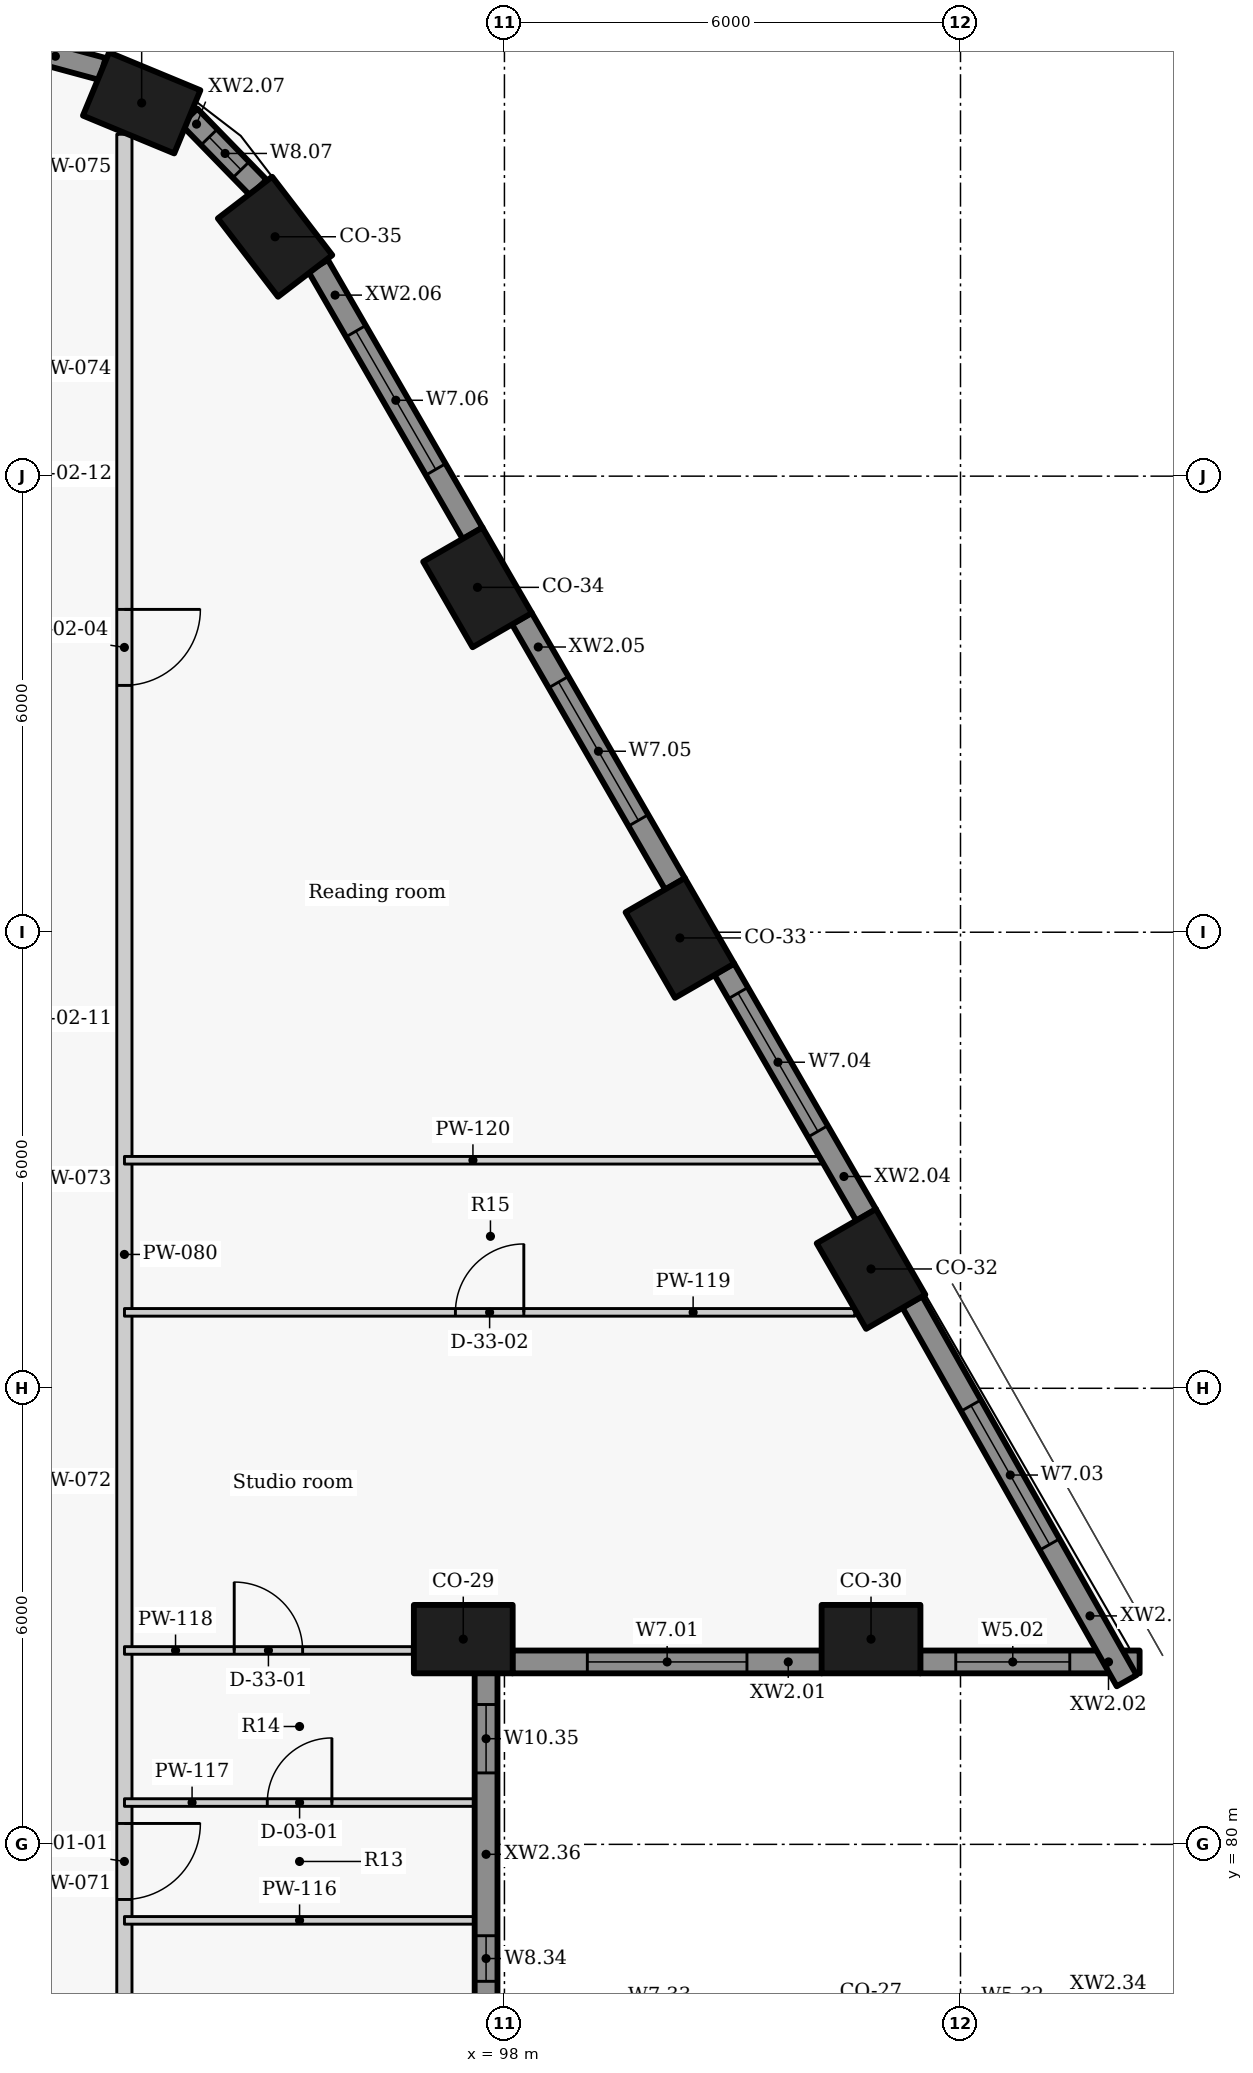
"""IFC4 building model, lengths in metres.
Left out: names, types, materials, properties, quantities, classifications, styles, units other than length and angle.
Written with IfcOpenShell. Run it as: python <this file> out.ifc"""

import sys

from ifc_helpers import new_model, si_unit, direction, frame, frame_2d, origin, origin_2d, place, context, subcontext, project, spatial, rectangle, extrude, element, fill, save


model = new_model("IFC4")
c1 = context("Model", 3, precision=1e-05, world=origin(), true_north=direction((0.0, 1.0)))
c2 = subcontext(c1, "Body", "Model", "MODEL_VIEW")
j1 = project(units=[si_unit("LENGTHUNIT", "METRE"), si_unit("PLANEANGLEUNIT", "RADIAN")], contexts=[c1])
p1 = place(None, origin())
s1 = spatial("IfcSite", under=j1, at=p1, CompositionType="ELEMENT")
p2 = place(p1, origin())
s2 = spatial("IfcBuilding", under=s1, at=p2, CompositionType="ELEMENT")
p3 = place(p2, frame((0.0, 0.0, 150.3)))
s3 = spatial("IfcBuildingStorey", under=s2, at=p3, CompositionType="ELEMENT", Elevation=150.3)
for number, where, z_axis, x_axis in (
    (1, (97.458, 82.7, 0.0), (0.0, 0.0, 1.0), (1.0, 0.0, 0.0)),
    (2, (102.823, 82.7, 0.0), (0.0, 0.0, 1.0), (1.0, 0.0, 0.0)),
    (3, (102.823, 87.57, 0.0), (0.0, 0.0, 1.0), (-0.5, 0.866, 0.0)),
    (4, (100.308, 91.925, 0.0), (0.0, 0.0, 1.0), (-0.5, 0.866, 0.0)),
    (5, (97.646, 96.537, 0.0), (0.0, 0.0, 1.0), (-0.5, 0.866, 0.0)),
    (6, (94.982, 101.149, 0.0), (0.0, 0.0, 1.0), (-0.609, 0.793, 0.0)),
    (7, (93.227, 102.91, 0.0), (0.0, 0.0, 1.0), (-0.924, 0.383, 0.0)),
):
    element("IfcColumn", number, at=place(p3, frame(where, z_axis=z_axis, x_axis=x_axis)), inside=s3, PredefinedType="COLUMN", context=c2, shape_type="SweptSolid", body=[
        extrude(rectangle(XDim=1.3, YDim=0.9, at=origin_2d()), origin(), (0.0, 0.0, 1.0), 3.3),
    ])
p4 = place(p3, frame((98.104, 82.4, 0.0), z_axis=(0.0, 0.0, 1.0), x_axis=(1.0, 0.0, 0.0)))
e8 = element("IfcWall", 8, at=p4, inside=s3, PredefinedType="SOLIDWALL", context=c2, shape_type="SweptSolid", body=[
    extrude(rectangle(XDim=4.073, YDim=0.3, at=frame_2d((2.036, 0.0))), origin(), (0.0, 0.0, 1.0), 2.425),
])
p5 = place(p4, frame((0.986, 0.0, 0.9)))
e9 = element("IfcOpeningElement", 9, at=p5, cuts=e8, PredefinedType="OPENING", context=c2, shape_type="SweptSolid", body=[
    extrude(rectangle(XDim=2.1, YDim=1.1, at=frame_2d((1.05, 0.55))), frame((0.0, 0.16, 0.0), z_axis=(0.0, -1.0, 0.0), x_axis=(1.0, 0.0, 0.0)), (0.0, 0.0, 1.0), 0.32),
])
p6 = place(p3, frame((103.469, 82.4, 0.0), z_axis=(0.0, 0.0, 1.0), x_axis=(1.0, 0.0, 0.0)))
e10 = element("IfcWall", 10, at=p6, inside=s3, PredefinedType="SOLIDWALL", context=c2, shape_type="SweptSolid", body=[
    extrude(rectangle(XDim=2.888, YDim=0.3, at=frame_2d((1.444, 0.0))), origin(), (0.0, 0.0, 1.0), 2.425),
])
p7 = place(p6, frame((0.469, 0.0, 0.9)))
e11 = element("IfcOpeningElement", 11, at=p7, cuts=e10, PredefinedType="OPENING", context=c2, shape_type="SweptSolid", body=[
    extrude(rectangle(XDim=1.5, YDim=1.1, at=frame_2d((0.75, 0.55))), frame((0.0, 0.16, 0.0), z_axis=(0.0, -1.0, 0.0), x_axis=(1.0, 0.0, 0.0)), (0.0, 0.0, 1.0), 0.32),
])
p8 = place(p3, frame((106.186, 82.153, 0.0), z_axis=(0.0, 0.0, 1.0), x_axis=(-0.492498306264, 0.87031340236, 0.0)))
e12 = element("IfcWall", 12, at=p8, inside=s3, PredefinedType="SOLIDWALL", context=c2, shape_type="SweptSolid", body=[
    extrude(rectangle(XDim=5.727, YDim=0.3, at=frame_2d((2.863, 0.0))), origin(), (0.0, 0.0, 1.0), 2.425),
])
p9 = place(p8, frame((2.059, 0.0, 0.9)))
e13 = element("IfcOpeningElement", 13, at=p9, cuts=e12, PredefinedType="OPENING", context=c2, shape_type="SweptSolid", body=[
    extrude(rectangle(XDim=2.1, YDim=1.1, at=frame_2d((1.05, 0.55))), frame((0.0, 0.16, 0.0), z_axis=(0.0, -1.0, 0.0), x_axis=(1.0, 0.0, 0.0)), (0.0, 0.0, 1.0), 0.32),
])
p10 = place(p3, frame((102.76, 88.279, 0.0), z_axis=(0.0, 0.0, 1.0), x_axis=(-0.499933594891, 0.866063739398, 0.0)))
e14 = element("IfcWall", 14, at=p10, inside=s3, PredefinedType="SOLIDWALL", context=c2, shape_type="SweptSolid", body=[
    extrude(rectangle(XDim=3.737, YDim=0.3, at=frame_2d((1.868, 0.0))), origin(), (0.0, 0.0, 1.0), 2.425),
])
p11 = place(p10, frame((1.272, 0.0, 0.9)))
e15 = element("IfcOpeningElement", 15, at=p11, cuts=e14, PredefinedType="OPENING", context=c2, shape_type="SweptSolid", body=[
    extrude(rectangle(XDim=2.1, YDim=1.1, at=frame_2d((1.05, 0.55))), frame((0.0, 0.16, 0.0), z_axis=(0.0, -1.0, 0.0), x_axis=(1.0, 0.0, 0.0)), (0.0, 0.0, 1.0), 0.32),
])
p12 = place(p3, frame((100.245, 92.634, 0.0), z_axis=(0.0, 0.0, 1.0), x_axis=(-0.500031546601, 0.86600718958, 0.0)))
e16 = element("IfcWall", 16, at=p12, inside=s3, PredefinedType="SOLIDWALL", context=c2, shape_type="SweptSolid", body=[
    extrude(rectangle(XDim=4.034, YDim=0.3, at=frame_2d((2.017, 0.0))), origin(), (0.0, 0.0, 1.0), 2.425),
])
p13 = place(p12, frame((0.967, 0.0, 0.9)))
e17 = element("IfcOpeningElement", 17, at=p13, cuts=e16, PredefinedType="OPENING", context=c2, shape_type="SweptSolid", body=[
    extrude(rectangle(XDim=2.1, YDim=1.1, at=frame_2d((1.05, 0.55))), frame((0.0, 0.16, 0.0), z_axis=(0.0, -1.0, 0.0), x_axis=(1.0, 0.0, 0.0)), (0.0, 0.0, 1.0), 0.32),
])
p14 = place(p3, frame((97.582, 97.247, 0.0), z_axis=(0.0, 0.0, 1.0), x_axis=(-0.500018589245, 0.866014671013, 0.0)))
e18 = element("IfcWall", 18, at=p14, inside=s3, PredefinedType="SOLIDWALL", context=c2, shape_type="SweptSolid", body=[
    extrude(rectangle(XDim=4.068, YDim=0.3, at=frame_2d((2.034, 0.0))), origin(), (0.0, 0.0, 1.0), 2.425),
])
p15 = place(p14, frame((0.973, 0.0, 0.9)))
e19 = element("IfcOpeningElement", 19, at=p15, cuts=e18, PredefinedType="OPENING", context=c2, shape_type="SweptSolid", body=[
    extrude(rectangle(XDim=2.1, YDim=1.1, at=frame_2d((1.05, 0.55))), frame((0.0, 0.16, 0.0), z_axis=(0.0, -1.0, 0.0), x_axis=(1.0, 0.0, 0.0)), (0.0, 0.0, 1.0), 0.32),
])
p16 = place(p3, frame((94.763, 101.795, 0.0), z_axis=(0.0, 0.0, 1.0), x_axis=(-0.697598997785, 0.716488407645, 0.0)))
e20 = element("IfcWall", 20, at=p16, inside=s3, PredefinedType="SOLIDWALL", context=c2, shape_type="SweptSolid", body=[
    extrude(rectangle(XDim=1.305, YDim=0.3, at=frame_2d((0.653, 0.0))), origin(), (0.0, 0.0, 1.0), 2.425),
])
p17 = place(p16, frame((0.328, 0.0, 0.9)))
e21 = element("IfcOpeningElement", 21, at=p17, cuts=e20, PredefinedType="OPENING", context=c2, shape_type="SweptSolid", body=[
    extrude(rectangle(XDim=0.6, YDim=1.1, at=frame_2d((0.3, 0.55))), frame((0.0, 0.16, 0.0), z_axis=(0.0, -1.0, 0.0), x_axis=(1.0, 0.0, 0.0)), (0.0, 0.0, 1.0), 0.32),
])
p18 = place(p3, frame((92.713, 103.356, 0.0), z_axis=(0.0, 0.0, 1.0), x_axis=(-0.965274225809, 0.26123872031, 0.0)))
e22 = element("IfcWall", 22, at=p18, inside=s3, PredefinedType="SOLIDWALL", context=c2, shape_type="SweptSolid", body=[
    extrude(rectangle(XDim=1.287, YDim=0.3, at=frame_2d((0.644, 0.0))), origin(), (0.0, 0.0, 1.0), 2.425),
])
p19 = place(p3, frame((97.758, 77.946, 0.0), z_axis=(0.0, 0.0, 1.0), x_axis=(0.0, 1.0, 0.0)))
e23 = element("IfcWall", 23, at=p19, inside=s3, PredefinedType="SOLIDWALL", context=c2, shape_type="SweptSolid", body=[
    extrude(rectangle(XDim=4.308, YDim=0.3, at=frame_2d((2.154, 0.0))), origin(), (0.0, 0.0, 1.0), 2.425),
])
p20 = place(p19, frame((0.252, 0.0, 0.9)))
e24 = element("IfcOpeningElement", 24, at=p20, cuts=e23, PredefinedType="OPENING", context=c2, shape_type="SweptSolid", body=[
    extrude(rectangle(XDim=0.6, YDim=1.1, at=frame_2d((0.3, 0.55))), frame((0.0, 0.16, 0.0), z_axis=(0.0, -1.0, 0.0), x_axis=(1.0, 0.0, 0.0)), (0.0, 0.0, 1.0), 0.32),
])
p21 = place(p19, frame((2.994, 0.0, 1.5)))
e25 = element("IfcOpeningElement", 25, at=p21, cuts=e23, PredefinedType="OPENING", context=c2, shape_type="SweptSolid", body=[
    extrude(rectangle(XDim=0.9, YDim=0.5, at=frame_2d((0.45, 0.25))), frame((0.0, 0.16, 0.0), z_axis=(0.0, -1.0, 0.0), x_axis=(1.0, 0.0, 0.0)), (0.0, 0.0, 1.0), 0.32),
])
p22 = place(p3, frame((93.0, 102.498, 0.0), z_axis=(0.0, 0.0, 1.0), x_axis=(0.0, -1.0, 0.0)))
e26 = element("IfcWall", 26, at=p22, inside=s3, PredefinedType="PARTITIONING", context=c2, shape_type="SweptSolid", body=[
    extrude(rectangle(XDim=45.665, YDim=0.2, at=frame_2d((22.833, 0.0))), origin(), (0.0, 0.0, 1.0), 2.405),
])
p23 = place(p22, frame((34.081, 0.0, 0.0)))
e27 = element("IfcOpeningElement", 27, at=p23, cuts=e26, PredefinedType="OPENING", context=c2, shape_type="SweptSolid", body=[
    extrude(rectangle(XDim=1.0, YDim=2.1, at=frame_2d((0.5, 1.05))), frame((0.0, 0.11, 0.0), z_axis=(0.0, -1.0, 0.0), x_axis=(1.0, 0.0, 0.0)), (0.0, 0.0, 1.0), 0.22),
])
p24 = place(p22, frame((22.223, 0.0, 0.0)))
e28 = element("IfcOpeningElement", 28, at=p24, cuts=e26, PredefinedType="OPENING", context=c2, shape_type="SweptSolid", body=[
    extrude(rectangle(XDim=1.0, YDim=2.1, at=frame_2d((0.5, 1.05))), frame((0.0, 0.11, 0.0), z_axis=(0.0, -1.0, 0.0), x_axis=(1.0, 0.0, 0.0)), (0.0, 0.0, 1.0), 0.22),
])
p25 = place(p22, frame((6.251, 0.0, 0.0)))
e29 = element("IfcOpeningElement", 29, at=p25, cuts=e26, PredefinedType="OPENING", context=c2, shape_type="SweptSolid", body=[
    extrude(rectangle(XDim=1.0, YDim=2.1, at=frame_2d((0.5, 1.05))), frame((0.0, 0.11, 0.0), z_axis=(0.0, -1.0, 0.0), x_axis=(1.0, 0.0, 0.0)), (0.0, 0.0, 1.0), 0.22),
])
p26 = place(p3, frame((93.001, 79.0, 0.0), z_axis=(0.0, 0.0, 1.0), x_axis=(1.0, 0.0, 0.0)))
e30 = element("IfcWall", 30, at=p26, inside=s3, PredefinedType="PARTITIONING", context=c2, shape_type="SweptSolid", body=[
    extrude(rectangle(XDim=4.607, YDim=0.1, at=frame_2d((2.304, 0.0))), origin(), (0.0, 0.0, 1.0), 2.405),
])
p27 = place(p3, frame((93.001, 80.55, 0.0), z_axis=(0.0, 0.0, 1.0), x_axis=(1.0, 0.0, 0.0)))
e31 = element("IfcWall", 31, at=p27, inside=s3, PredefinedType="PARTITIONING", context=c2, shape_type="SweptSolid", body=[
    extrude(rectangle(XDim=4.607, YDim=0.1, at=frame_2d((2.304, 0.0))), origin(), (0.0, 0.0, 1.0), 2.405),
])
p28 = place(p27, frame((1.879, 0.0, 0.0)))
e32 = element("IfcOpeningElement", 32, at=p28, cuts=e31, PredefinedType="OPENING", context=c2, shape_type="SweptSolid", body=[
    extrude(rectangle(XDim=0.85, YDim=2.1, at=frame_2d((0.425, 1.05))), frame((0.0, 0.06, 0.0), z_axis=(0.0, -1.0, 0.0), x_axis=(1.0, 0.0, 0.0)), (0.0, 0.0, 1.0), 0.12),
])
p29 = place(p3, frame((93.001, 82.551, 0.0), z_axis=(0.0, 0.0, 1.0), x_axis=(1.0, 0.0, 0.0)))
e33 = element("IfcWall", 33, at=p29, inside=s3, PredefinedType="PARTITIONING", context=c2, shape_type="SweptSolid", body=[
    extrude(rectangle(XDim=3.787, YDim=0.1, at=frame_2d((1.894, 0.0))), origin(), (0.0, 0.0, 1.0), 3.025),
])
p30 = place(p29, frame((1.444, 0.0, 0.0)))
e34 = element("IfcOpeningElement", 34, at=p30, cuts=e33, PredefinedType="OPENING", context=c2, shape_type="SweptSolid", body=[
    extrude(rectangle(XDim=0.9, YDim=2.1, at=frame_2d((0.45, 1.05))), frame((0.0, 0.06, 0.0), z_axis=(0.0, -1.0, 0.0), x_axis=(1.0, 0.0, 0.0)), (0.0, 0.0, 1.0), 0.12),
])
p31 = place(p3, frame((93.001, 86.999, 0.0), z_axis=(0.0, 0.0, 1.0), x_axis=(1.0, 0.0, 0.0)))
e35 = element("IfcWall", 35, at=p31, inside=s3, PredefinedType="PARTITIONING", context=c2, shape_type="SweptSolid", body=[
    extrude(rectangle(XDim=9.609, YDim=0.1, at=frame_2d((4.804, 0.0))), origin(), (0.0, 0.0, 1.0), 3.025),
])
p32 = place(p31, frame((4.354, 0.0, 0.0)))
e36 = element("IfcOpeningElement", 36, at=p32, cuts=e35, PredefinedType="OPENING", context=c2, shape_type="SweptSolid", body=[
    extrude(rectangle(XDim=0.9, YDim=2.1, at=frame_2d((0.45, 1.05))), frame((0.0, 0.06, 0.0), z_axis=(0.0, -1.0, 0.0), x_axis=(1.0, 0.0, 0.0)), (0.0, 0.0, 1.0), 0.12),
])
p33 = place(p3, frame((93.001, 89.0, 0.0), z_axis=(0.0, 0.0, 1.0), x_axis=(1.0, 0.0, 0.0)))
e37 = element("IfcWall", 37, at=p33, inside=s3, PredefinedType="PARTITIONING", context=c2, shape_type="SweptSolid", body=[
    extrude(rectangle(XDim=9.169, YDim=0.1, at=frame_2d((4.584, 0.0))), origin(), (0.0, 0.0, 1.0), 2.405),
])
p34 = place(p5, origin())
e38 = element("IfcWindow", 38, at=p34, inside=s3, PartitioningType="SINGLE_PANEL", PredefinedType="WINDOW", context=c2, shape_type="SweptSolid", body=[
    extrude(rectangle(XDim=2.1, YDim=1.1, at=frame_2d((1.05, 0.55))), frame((0.0, 0.03, 0.0), z_axis=(0.0, -1.0, 0.0), x_axis=(1.0, 0.0, 0.0)), (0.0, 0.0, 1.0), 0.06),
])
fill(e9, e38)
p35 = place(p7, origin())
e39 = element("IfcWindow", 39, at=p35, inside=s3, PartitioningType="SINGLE_PANEL", PredefinedType="WINDOW", context=c2, shape_type="SweptSolid", body=[
    extrude(rectangle(XDim=1.5, YDim=1.1, at=frame_2d((0.75, 0.55))), frame((0.0, 0.03, 0.0), z_axis=(0.0, -1.0, 0.0), x_axis=(1.0, 0.0, 0.0)), (0.0, 0.0, 1.0), 0.06),
])
fill(e11, e39)
p36 = place(p9, origin())
e40 = element("IfcWindow", 40, at=p36, inside=s3, PartitioningType="SINGLE_PANEL", PredefinedType="WINDOW", context=c2, shape_type="SweptSolid", body=[
    extrude(rectangle(XDim=2.1, YDim=1.1, at=frame_2d((1.05, 0.55))), frame((0.0, 0.03, 0.0), z_axis=(0.0, -1.0, 0.0), x_axis=(1.0, 0.0, 0.0)), (0.0, 0.0, 1.0), 0.06),
])
fill(e13, e40)
p37 = place(p11, origin())
e41 = element("IfcWindow", 41, at=p37, inside=s3, PartitioningType="SINGLE_PANEL", PredefinedType="WINDOW", context=c2, shape_type="SweptSolid", body=[
    extrude(rectangle(XDim=2.1, YDim=1.1, at=frame_2d((1.05, 0.55))), frame((0.0, 0.03, 0.0), z_axis=(0.0, -1.0, 0.0), x_axis=(1.0, 0.0, 0.0)), (0.0, 0.0, 1.0), 0.06),
])
fill(e15, e41)
p38 = place(p13, origin())
e42 = element("IfcWindow", 42, at=p38, inside=s3, PartitioningType="SINGLE_PANEL", PredefinedType="WINDOW", context=c2, shape_type="SweptSolid", body=[
    extrude(rectangle(XDim=2.1, YDim=1.1, at=frame_2d((1.05, 0.55))), frame((0.0, 0.03, 0.0), z_axis=(0.0, -1.0, 0.0), x_axis=(1.0, 0.0, 0.0)), (0.0, 0.0, 1.0), 0.06),
])
fill(e17, e42)
p39 = place(p15, origin())
e43 = element("IfcWindow", 43, at=p39, inside=s3, PartitioningType="SINGLE_PANEL", PredefinedType="WINDOW", context=c2, shape_type="SweptSolid", body=[
    extrude(rectangle(XDim=2.1, YDim=1.1, at=frame_2d((1.05, 0.55))), frame((0.0, 0.03, 0.0), z_axis=(0.0, -1.0, 0.0), x_axis=(1.0, 0.0, 0.0)), (0.0, 0.0, 1.0), 0.06),
])
fill(e19, e43)
p40 = place(p17, origin())
e44 = element("IfcWindow", 44, at=p40, inside=s3, PartitioningType="SINGLE_PANEL", PredefinedType="WINDOW", context=c2, shape_type="SweptSolid", body=[
    extrude(rectangle(XDim=0.6, YDim=1.1, at=frame_2d((0.3, 0.55))), frame((0.0, 0.03, 0.0), z_axis=(0.0, -1.0, 0.0), x_axis=(1.0, 0.0, 0.0)), (0.0, 0.0, 1.0), 0.06),
])
fill(e21, e44)
p41 = place(p20, origin())
e45 = element("IfcWindow", 45, at=p41, inside=s3, PartitioningType="SINGLE_PANEL", PredefinedType="WINDOW", context=c2, shape_type="SweptSolid", body=[
    extrude(rectangle(XDim=0.6, YDim=1.1, at=frame_2d((0.3, 0.55))), frame((0.0, 0.03, 0.0), z_axis=(0.0, -1.0, 0.0), x_axis=(1.0, 0.0, 0.0)), (0.0, 0.0, 1.0), 0.06),
])
fill(e24, e45)
p42 = place(p21, origin())
e46 = element("IfcWindow", 46, at=p42, inside=s3, PartitioningType="SINGLE_PANEL", PredefinedType="WINDOW", context=c2, shape_type="SweptSolid", body=[
    extrude(rectangle(XDim=0.9, YDim=0.5, at=frame_2d((0.45, 0.25))), frame((0.0, 0.03, 0.0), z_axis=(0.0, -1.0, 0.0), x_axis=(1.0, 0.0, 0.0)), (0.0, 0.0, 1.0), 0.06),
])
fill(e25, e46)
p43 = place(p24, origin())
e47 = element("IfcDoor", 47, at=p43, inside=s3, OperationType="SINGLE_SWING_LEFT", PredefinedType="DOOR", context=c2, shape_type="SweptSolid", body=[
    extrude(rectangle(XDim=1.0, YDim=2.1, at=frame_2d((0.5, 1.05))), frame((0.0, 0.025, 0.0), z_axis=(0.0, -1.0, 0.0), x_axis=(1.0, 0.0, 0.0)), (0.0, 0.0, 1.0), 0.05),
])
fill(e28, e47)
p44 = place(p28, origin())
e48 = element("IfcDoor", 48, at=p44, inside=s3, OperationType="SINGLE_SWING_RIGHT", PredefinedType="DOOR", context=c2, shape_type="SweptSolid", body=[
    extrude(rectangle(XDim=0.85, YDim=2.1, at=frame_2d((0.425, 1.05))), frame((0.0, 0.025, 0.0), z_axis=(0.0, -1.0, 0.0), x_axis=(1.0, 0.0, 0.0)), (0.0, 0.0, 1.0), 0.05),
])
fill(e32, e48)
p45 = place(p30, origin())
e49 = element("IfcDoor", 49, at=p45, inside=s3, OperationType="SINGLE_SWING_LEFT", PredefinedType="DOOR", context=c2, shape_type="SweptSolid", body=[
    extrude(rectangle(XDim=0.9, YDim=2.1, at=frame_2d((0.45, 1.05))), frame((0.0, 0.025, 0.0), z_axis=(0.0, -1.0, 0.0), x_axis=(1.0, 0.0, 0.0)), (0.0, 0.0, 1.0), 0.05),
])
fill(e34, e49)
p46 = place(p32, origin())
e50 = element("IfcDoor", 50, at=p46, inside=s3, OperationType="SINGLE_SWING_RIGHT", PredefinedType="DOOR", context=c2, shape_type="SweptSolid", body=[
    extrude(rectangle(XDim=0.9, YDim=2.1, at=frame_2d((0.45, 1.05))), frame((0.0, 0.025, 0.0), z_axis=(0.0, -1.0, 0.0), x_axis=(1.0, 0.0, 0.0)), (0.0, 0.0, 1.0), 0.05),
])
fill(e36, e50)
p47 = place(p25, origin())
e51 = element("IfcDoor", 51, at=p47, inside=s3, OperationType="SINGLE_SWING_LEFT", PredefinedType="DOOR", context=c2, shape_type="SweptSolid", body=[
    extrude(rectangle(XDim=1.0, YDim=2.1, at=frame_2d((0.5, 1.05))), frame((0.0, 0.025, 0.0), z_axis=(0.0, -1.0, 0.0), x_axis=(1.0, 0.0, 0.0)), (0.0, 0.0, 1.0), 0.05),
])
fill(e29, e51)
save(model, sys.argv[1])
